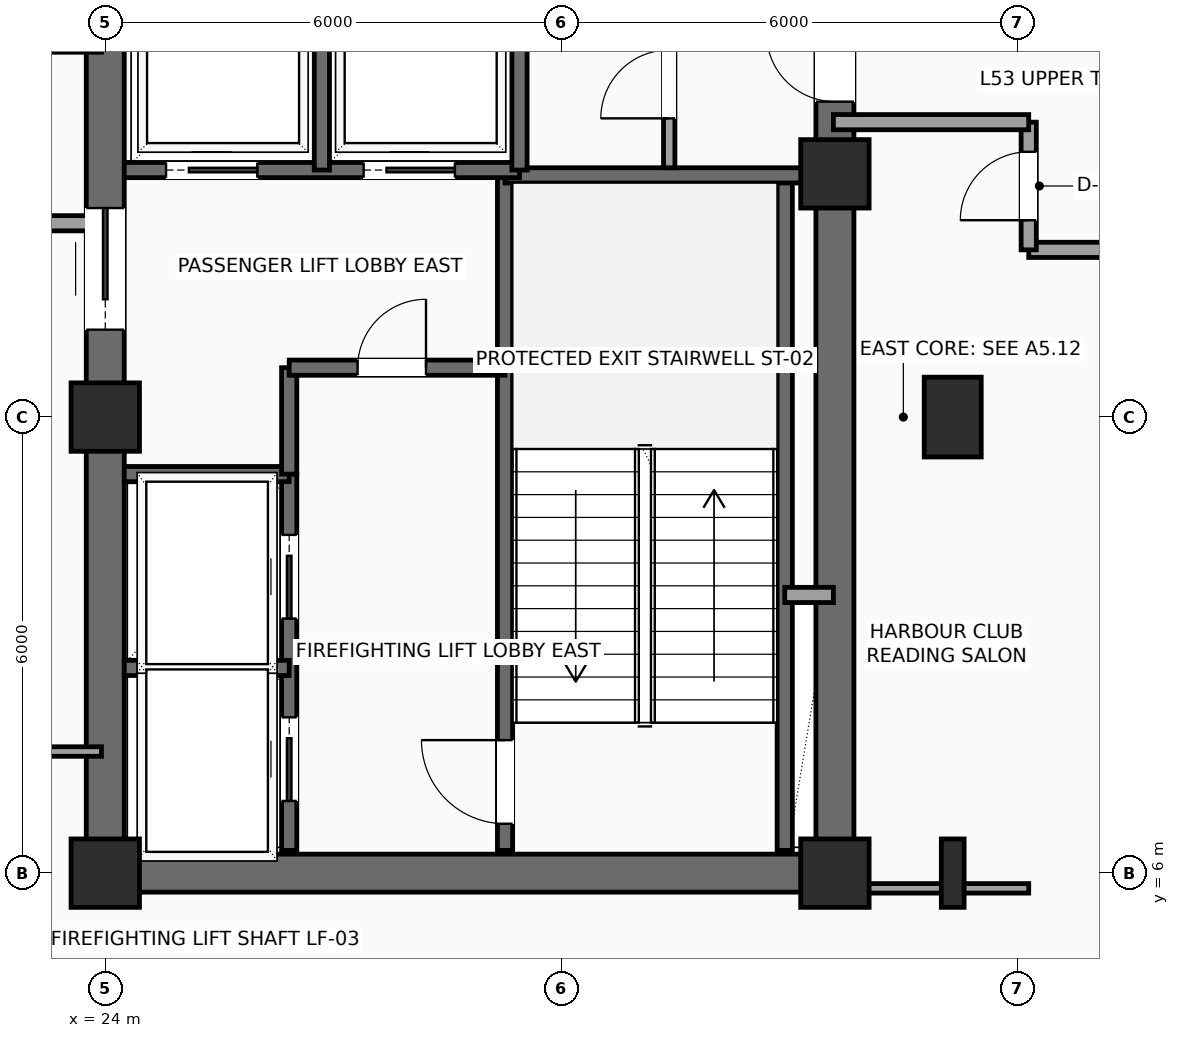
"""IFC4 building model, lengths in metres.
Left out: names, types, materials, properties, quantities, classifications, styles, units other than length and angle.
Written with IfcOpenShell. Run it as: python <this file> out.ifc"""

import sys

from ifc_helpers import new_model, si_unit, direction, frame, frame_2d, origin, origin_2d, place, context, subcontext, project, spatial, rectangle, i_section, extrude, element, fill, save


model = new_model("IFC4")
c1 = context("Model", 3, precision=1e-05, world=origin(), true_north=direction((0.0, 1.0)))
c2 = subcontext(c1, "Body", "Model", "MODEL_VIEW")
j1 = project(units=[si_unit("LENGTHUNIT", "METRE"), si_unit("PLANEANGLEUNIT", "RADIAN")], contexts=[c1])
p1 = place(None, origin())
s1 = spatial("IfcSite", under=j1, at=p1, CompositionType="ELEMENT")
p2 = place(p1, origin())
s2 = spatial("IfcBuilding", under=s1, at=p2, CompositionType="ELEMENT")
p3 = place(p2, frame((0.0, 0.0, 216.15)))
s3 = spatial("IfcBuildingStorey", under=s2, at=p3, CompositionType="ELEMENT", Elevation=216.15)
for number, where, z_axis, x_axis in (
    (1, (24.0, 6.0, 0.0), (0.0, 0.0, 1.0), (1.0, 0.0, 0.0)),
    (2, (24.0, 12.0, 0.0), (0.0, 0.0, 1.0), (1.0, 0.0, 0.0)),
    (3, (33.6, 6.0, 0.0), (0.0, 0.0, 1.0), (1.0, 0.0, 0.0)),
    (4, (33.6, 15.2, 0.0), (0.0, 0.0, 1.0), (1.0, 0.0, 0.0)),
):
    element("IfcColumn", number, at=place(p3, frame(where, z_axis=z_axis, x_axis=x_axis)), inside=s3, PredefinedType="COLUMN", context=c2, shape_type="SweptSolid", body=[
        extrude(rectangle(XDim=0.9, YDim=0.9, at=origin_2d()), origin(), (0.0, 0.0, 1.0), 3.75),
    ])
p4 = place(p3, frame((35.15, 6.0, 0.0), z_axis=(0.0, 0.0, 1.0), x_axis=(1.0, 0.0, 0.0)))
e5 = element("IfcColumn", 5, at=p4, inside=s3, PredefinedType="COLUMN", context=c2, shape_type="SweptSolid", body=[
    extrude(i_section(OverallWidth=0.3, OverallDepth=0.9, WebThickness=0.019, FlangeThickness=0.035, FilletRadius=0.03, at=origin_2d()), origin(), (0.0, 0.0, 1.0), 3.75),
])
p5 = place(p3, frame((35.15, 12.0, 0.0), z_axis=(0.0, 0.0, 1.0), x_axis=(1.0, 0.0, 0.0)))
e6 = element("IfcColumn", 6, at=p5, inside=s3, PredefinedType="COLUMN", context=c2, shape_type="SweptSolid", body=[
    extrude(rectangle(XDim=0.75, YDim=1.05, at=origin_2d()), origin(), (0.0, 0.0, 1.0), 3.75),
])
p6 = place(p3, frame((24.0, 6.0, 0.0), z_axis=(0.0, 0.0, 1.0), x_axis=(1.0, 0.0, 0.0)))
e7 = element("IfcWall", 7, at=p6, inside=s3, PredefinedType="SHEAR", context=c2, shape_type="SweptSolid", body=[
    extrude(rectangle(XDim=9.6, YDim=0.5, at=frame_2d((4.8, 0.0))), origin(), (0.0, 0.0, 1.0), 3.54),
])
p7 = place(p3, frame((24.0, 6.0, 0.0), z_axis=(0.0, 0.0, 1.0), x_axis=(0.0, 1.0, 0.0)))
e8 = element("IfcWall", 8, at=p7, inside=s3, PredefinedType="SHEAR", context=c2, shape_type="SweptSolid", body=[
    extrude(rectangle(XDim=12.0, YDim=0.5, at=frame_2d((6.0, 0.0))), origin(), (0.0, 0.0, 1.0), 3.54),
])
p8 = place(p7, frame((7.15, 0.0, 0.0)))
e9 = element("IfcOpeningElement", 9, at=p8, cuts=e8, PredefinedType="OPENING", context=c2, shape_type="SweptSolid", body=[
    extrude(rectangle(XDim=1.6, YDim=2.3, at=frame_2d((0.8, 1.15))), frame((0.0, 0.26, 0.0), z_axis=(0.0, -1.0, 0.0), x_axis=(1.0, 0.0, 0.0)), (0.0, 0.0, 1.0), 0.52),
])
p9 = place(p3, frame((33.6, 6.0, 0.0), z_axis=(0.0, 0.0, 1.0), x_axis=(0.0, 1.0, 0.0)))
e10 = element("IfcWall", 10, at=p9, inside=s3, PredefinedType="SHEAR", context=c2, shape_type="SweptSolid", body=[
    extrude(rectangle(XDim=12.0, YDim=0.5, at=frame_2d((6.0, 0.0))), origin(), (0.0, 0.0, 1.0), 3.54),
])
p10 = place(p9, frame((10.15, 0.0, 0.0)))
e11 = element("IfcOpeningElement", 11, at=p10, cuts=e10, PredefinedType="OPENING", context=c2, shape_type="SweptSolid", body=[
    extrude(rectangle(XDim=0.9, YDim=2.15, at=frame_2d((0.45, 1.075))), frame((0.0, 0.26, 0.0), z_axis=(0.0, -1.0, 0.0), x_axis=(1.0, 0.0, 0.0)), (0.0, 0.0, 1.0), 0.52),
])
p11 = place(p3, frame((29.26, 6.3, 0.0), z_axis=(0.0, 0.0, 1.0), x_axis=(0.0, 1.0, 0.0)))
e12 = element("IfcWall", 12, at=p11, inside=s3, PredefinedType="SHEAR", context=c2, shape_type="SweptSolid", body=[
    extrude(rectangle(XDim=8.88, YDim=0.2, at=frame_2d((4.44, 0.0))), origin(), (0.0, 0.0, 1.0), 3.54),
])
p12 = place(p11, frame((0.35, 0.0, 0.0)))
e13 = element("IfcOpeningElement", 13, at=p12, cuts=e12, PredefinedType="OPENING", context=c2, shape_type="SweptSolid", body=[
    extrude(rectangle(XDim=1.1, YDim=2.2, at=frame_2d((0.55, 1.1))), frame((0.0, 0.11, 0.0), z_axis=(0.0, -1.0, 0.0), x_axis=(1.0, 0.0, 0.0)), (0.0, 0.0, 1.0), 0.22),
])
p13 = place(p3, frame((32.94, 6.3, 0.0), z_axis=(0.0, 0.0, 1.0), x_axis=(0.0, 1.0, 0.0)))
e14 = element("IfcWall", 14, at=p13, inside=s3, PredefinedType="SHEAR", context=c2, shape_type="SweptSolid", body=[
    extrude(rectangle(XDim=8.88, YDim=0.2, at=frame_2d((4.44, 0.0))), origin(), (0.0, 0.0, 1.0), 3.54),
])
p14 = place(p3, frame((29.26, 15.18, 0.0), z_axis=(0.0, 0.0, 1.0), x_axis=(1.0, 0.0, 0.0)))
e15 = element("IfcWall", 15, at=p14, inside=s3, PredefinedType="SHEAR", context=c2, shape_type="SweptSolid", body=[
    extrude(rectangle(XDim=4.04, YDim=0.2, at=frame_2d((2.02, 0.0))), origin(), (0.0, 0.0, 1.0), 3.54),
])
p15 = place(p3, frame((26.42, 6.3, 0.0), z_axis=(0.0, 0.0, 1.0), x_axis=(0.0, 1.0, 0.0)))
e16 = element("IfcWall", 16, at=p15, inside=s3, PredefinedType="SHEAR", context=c2, shape_type="SweptSolid", body=[
    extrude(rectangle(XDim=4.95, YDim=0.2, at=frame_2d((2.475, 0.0))), origin(), (0.0, 0.0, 1.0), 3.54),
])
p16 = place(p15, frame((0.65, 0.0, 0.0)))
e17 = element("IfcOpeningElement", 17, at=p16, cuts=e16, PredefinedType="OPENING", context=c2, shape_type="SweptSolid", body=[
    extrude(rectangle(XDim=1.1, YDim=2.2, at=frame_2d((0.55, 1.1))), frame((0.0, 0.11, 0.0), z_axis=(0.0, -1.0, 0.0), x_axis=(1.0, 0.0, 0.0)), (0.0, 0.0, 1.0), 0.22),
])
p17 = place(p15, frame((3.05, 0.0, 0.0)))
e18 = element("IfcOpeningElement", 18, at=p17, cuts=e16, PredefinedType="OPENING", context=c2, shape_type="SweptSolid", body=[
    extrude(rectangle(XDim=1.1, YDim=2.2, at=frame_2d((0.55, 1.1))), frame((0.0, 0.11, 0.0), z_axis=(0.0, -1.0, 0.0), x_axis=(1.0, 0.0, 0.0)), (0.0, 0.0, 1.0), 0.22),
])
for number, where, z_axis, x_axis in (
    (19, (24.25, 8.7, 0.0), (0.0, 0.0, 1.0), (1.0, 0.0, 0.0)),
    (20, (24.25, 11.25, 0.0), (0.0, 0.0, 1.0), (1.0, 0.0, 0.0)),
):
    element("IfcWall", number, at=place(p3, frame(where, z_axis=z_axis, x_axis=x_axis)), inside=s3, PredefinedType="SHEAR", context=c2, shape_type="SweptSolid", body=[
        extrude(rectangle(XDim=2.17, YDim=0.2, at=frame_2d((1.085, 0.0))), origin(), (0.0, 0.0, 1.0), 3.54),
    ])
p18 = place(p3, frame((26.42, 11.25, 0.0), z_axis=(0.0, 0.0, 1.0), x_axis=(0.0, 1.0, 0.0)))
e21 = element("IfcWall", 21, at=p18, inside=s3, PredefinedType="SHEAR", context=c2, shape_type="SweptSolid", body=[
    extrude(rectangle(XDim=1.4, YDim=0.2, at=frame_2d((0.7, 0.0))), origin(), (0.0, 0.0, 1.0), 3.54),
])
p19 = place(p3, frame((26.42, 12.65, 0.0), z_axis=(0.0, 0.0, 1.0), x_axis=(1.0, 0.0, 0.0)))
e22 = element("IfcWall", 22, at=p19, inside=s3, PredefinedType="SHEAR", context=c2, shape_type="SweptSolid", body=[
    extrude(rectangle(XDim=2.84, YDim=0.2, at=frame_2d((1.42, 0.0))), origin(), (0.0, 0.0, 1.0), 3.54),
])
p20 = place(p19, frame((0.9, 0.0, 0.0)))
e23 = element("IfcOpeningElement", 23, at=p20, cuts=e22, PredefinedType="OPENING", context=c2, shape_type="SweptSolid", body=[
    extrude(rectangle(XDim=0.9, YDim=2.15, at=frame_2d((0.45, 1.075))), frame((0.0, 0.11, 0.0), z_axis=(0.0, -1.0, 0.0), x_axis=(1.0, 0.0, 0.0)), (0.0, 0.0, 1.0), 0.22),
])
p21 = place(p3, frame((32.94, 9.66, 0.0), z_axis=(0.0, 0.0, 1.0), x_axis=(1.0, 0.0, 0.0)))
e24 = element("IfcWall", 24, at=p21, inside=s3, PredefinedType="SOLIDWALL", context=c2, shape_type="SweptSolid", body=[
    extrude(rectangle(XDim=0.64, YDim=0.2, at=frame_2d((0.32, 0.0))), origin(), (0.0, 0.0, 1.0), 3.54),
])
p22 = place(p3, frame((24.25, 15.25, 0.0), z_axis=(0.0, 0.0, 1.0), x_axis=(1.0, 0.0, 0.0)))
e25 = element("IfcWall", 25, at=p22, inside=s3, PredefinedType="SHEAR", context=c2, shape_type="SweptSolid", body=[
    extrude(rectangle(XDim=5.2, YDim=0.2, at=frame_2d((2.6, 0.0))), origin(), (0.0, 0.0, 1.0), 3.54),
])
p23 = place(p22, frame((0.55, 0.0, 0.0)))
e26 = element("IfcOpeningElement", 26, at=p23, cuts=e25, PredefinedType="OPENING", context=c2, shape_type="SweptSolid", body=[
    extrude(rectangle(XDim=1.2, YDim=2.2, at=frame_2d((0.6, 1.1))), frame((0.0, 0.11, 0.0), z_axis=(0.0, -1.0, 0.0), x_axis=(1.0, 0.0, 0.0)), (0.0, 0.0, 1.0), 0.22),
])
p24 = place(p22, frame((3.15, 0.0, 0.0)))
e27 = element("IfcOpeningElement", 27, at=p24, cuts=e25, PredefinedType="OPENING", context=c2, shape_type="SweptSolid", body=[
    extrude(rectangle(XDim=1.2, YDim=2.2, at=frame_2d((0.6, 1.1))), frame((0.0, 0.11, 0.0), z_axis=(0.0, -1.0, 0.0), x_axis=(1.0, 0.0, 0.0)), (0.0, 0.0, 1.0), 0.22),
])
p25 = place(p3, frame((26.85, 15.25, 0.0), z_axis=(0.0, 0.0, 1.0), x_axis=(0.0, 1.0, 0.0)))
e28 = element("IfcWall", 28, at=p25, inside=s3, PredefinedType="SHEAR", context=c2, shape_type="SweptSolid", body=[
    extrude(rectangle(XDim=2.4, YDim=0.2, at=frame_2d((1.2, 0.0))), origin(), (0.0, 0.0, 1.0), 3.54),
])
p26 = place(p3, frame((29.45, 15.25, 0.0), z_axis=(0.0, 0.0, 1.0), x_axis=(0.0, 1.0, 0.0)))
e29 = element("IfcWall", 29, at=p26, inside=s3, PredefinedType="SHEAR", context=c2, shape_type="SweptSolid", body=[
    extrude(rectangle(XDim=2.45, YDim=0.2, at=frame_2d((1.225, 0.0))), origin(), (0.0, 0.0, 1.0), 3.54),
])
p27 = place(p3, frame((31.42, 15.28, 0.0), z_axis=(0.0, 0.0, 1.0), x_axis=(0.0, 1.0, 0.0)))
e30 = element("IfcWall", 30, at=p27, inside=s3, PredefinedType="PARTITIONING", context=c2, shape_type="SweptSolid", body=[
    extrude(rectangle(XDim=2.42, YDim=0.15, at=frame_2d((1.21, 0.0))), origin(), (0.0, 0.0, 1.0), 3.54),
])
p28 = place(p27, frame((0.65, 0.0, 0.0)))
e31 = element("IfcOpeningElement", 31, at=p28, cuts=e30, PredefinedType="OPENING", context=c2, shape_type="SweptSolid", body=[
    extrude(rectangle(XDim=0.9, YDim=2.15, at=frame_2d((0.45, 1.075))), frame((0.0, 0.085, 0.0), z_axis=(0.0, -1.0, 0.0), x_axis=(1.0, 0.0, 0.0)), (0.0, 0.0, 1.0), 0.17),
])
p29 = place(p3, frame((38.55, 14.2, 0.0), z_axis=(0.0, 0.0, 1.0), x_axis=(-1.0, 0.0, 0.0)))
e32 = element("IfcWall", 32, at=p29, inside=s3, PredefinedType="PARTITIONING", context=c2, shape_type="SweptSolid", body=[
    extrude(rectangle(XDim=2.4, YDim=0.2, at=frame_2d((1.2, 0.0))), origin(), (0.0, 0.0, 1.0), 3.54),
])
p30 = place(p3, frame((36.15, 14.2, 0.0), z_axis=(0.0, 0.0, 1.0), x_axis=(0.0, 1.0, 0.0)))
e33 = element("IfcWall", 33, at=p30, inside=s3, PredefinedType="PARTITIONING", context=c2, shape_type="SweptSolid", body=[
    extrude(rectangle(XDim=1.68, YDim=0.2, at=frame_2d((0.84, 0.0))), origin(), (0.0, 0.0, 1.0), 3.54),
])
p31 = place(p30, frame((0.39, 0.0, 0.0)))
e34 = element("IfcOpeningElement", 34, at=p31, cuts=e33, PredefinedType="OPENING", context=c2, shape_type="SweptSolid", body=[
    extrude(rectangle(XDim=0.9, YDim=2.1, at=frame_2d((0.45, 1.05))), frame((0.0, 0.11, 0.0), z_axis=(0.0, -1.0, 0.0), x_axis=(1.0, 0.0, 0.0)), (0.0, 0.0, 1.0), 0.22),
])
p32 = place(p3, frame((36.15, 15.88, 0.0), z_axis=(0.0, 0.0, 1.0), x_axis=(-1.0, 0.0, 0.0)))
e35 = element("IfcWall", 35, at=p32, inside=s3, PredefinedType="PARTITIONING", context=c2, shape_type="SweptSolid", body=[
    extrude(rectangle(XDim=2.57, YDim=0.2, at=frame_2d((1.285, 0.0))), origin(), (0.0, 0.0, 1.0), 3.54),
])
p33 = place(p3, frame((20.45, 16.9, 0.0), z_axis=(0.0, 0.0, 1.0), x_axis=(1.0, 0.0, 0.0)))
e36 = element("IfcWall", 36, at=p33, inside=s3, PredefinedType="PARTITIONING", context=c2, shape_type="SweptSolid", body=[
    extrude(rectangle(XDim=3.5, YDim=0.2, at=frame_2d((1.75, 0.0))), origin(), (0.0, 0.0, 1.0), 3.54),
])
p34 = place(p3, frame((23.95, 14.55, 0.0), z_axis=(0.0, 0.0, 1.0), x_axis=(-1.0, 0.0, 0.0)))
e37 = element("IfcWall", 37, at=p34, inside=s3, PredefinedType="PARTITIONING", context=c2, shape_type="SweptSolid", body=[
    extrude(rectangle(XDim=9.0, YDim=0.2, at=frame_2d((4.5, 0.0))), origin(), (0.0, 0.0, 1.0), 3.54),
])
p35 = place(p34, frame((2.815, 0.0, 0.0)))
e38 = element("IfcOpeningElement", 38, at=p35, cuts=e37, PredefinedType="OPENING", context=c2, shape_type="SweptSolid", body=[
    extrude(rectangle(XDim=1.0, YDim=2.2, at=frame_2d((0.5, 1.1))), frame((0.0, 0.11, 0.0), z_axis=(0.0, -1.0, 0.0), x_axis=(1.0, 0.0, 0.0)), (0.0, 0.0, 1.0), 0.22),
])
p36 = place(p3, frame((33.65, 5.8, 0.0), z_axis=(0.0, 0.0, 1.0), x_axis=(1.0, 0.0, 0.0)))
e39 = element("IfcWall", 39, at=p36, inside=s3, PredefinedType="PARTITIONING", context=c2, shape_type="SweptSolid", body=[
    extrude(rectangle(XDim=2.5, YDim=0.125, at=frame_2d((1.25, 0.0))), origin(), (0.0, 0.0, 1.0), 3.132),
])
p37 = place(p3, frame((14.95, 7.6, 0.0), z_axis=(0.0, 0.0, 1.0), x_axis=(1.0, 0.0, 0.0)))
e40 = element("IfcWall", 40, at=p37, inside=s3, PredefinedType="PARTITIONING", context=c2, shape_type="SweptSolid", body=[
    extrude(rectangle(XDim=9.0, YDim=0.125, at=frame_2d((4.5, 0.0))), origin(), (0.0, 0.0, 1.0), 3.54),
])
p38 = place(p8, origin())
e41 = element("IfcDoor", 41, at=p38, inside=s3, OperationType="DOUBLE_DOOR_SLIDING", PredefinedType="DOOR", context=c2, shape_type="SweptSolid", body=[
    extrude(rectangle(XDim=1.6, YDim=2.3, at=frame_2d((0.8, 1.15))), frame((0.0, 0.025, 0.0), z_axis=(0.0, -1.0, 0.0), x_axis=(1.0, 0.0, 0.0)), (0.0, 0.0, 1.0), 0.05),
])
fill(e9, e41)
p39 = place(p10, origin())
e42 = element("IfcDoor", 42, at=p39, inside=s3, OperationType="SINGLE_SWING_RIGHT", PredefinedType="DOOR", context=c2, shape_type="SweptSolid", body=[
    extrude(rectangle(XDim=0.9, YDim=2.15, at=frame_2d((0.45, 1.075))), frame((0.0, 0.025, 0.0), z_axis=(0.0, -1.0, 0.0), x_axis=(1.0, 0.0, 0.0)), (0.0, 0.0, 1.0), 0.05),
])
fill(e11, e42)
p40 = place(p12, origin())
e43 = element("IfcDoor", 43, at=p40, inside=s3, OperationType="SINGLE_SWING_RIGHT", PredefinedType="DOOR", context=c2, shape_type="SweptSolid", body=[
    extrude(rectangle(XDim=1.1, YDim=2.2, at=frame_2d((0.55, 1.1))), frame((0.0, 0.025, 0.0), z_axis=(0.0, -1.0, 0.0), x_axis=(1.0, 0.0, 0.0)), (0.0, 0.0, 1.0), 0.05),
])
fill(e13, e43)
p41 = place(p16, origin())
e44 = element("IfcDoor", 44, at=p41, inside=s3, OperationType="SLIDING_TO_LEFT", PredefinedType="DOOR", context=c2, shape_type="SweptSolid", body=[
    extrude(rectangle(XDim=1.1, YDim=2.2, at=frame_2d((0.55, 1.1))), frame((0.0, 0.025, 0.0), z_axis=(0.0, -1.0, 0.0), x_axis=(1.0, 0.0, 0.0)), (0.0, 0.0, 1.0), 0.05),
])
fill(e17, e44)
p42 = place(p17, origin())
e45 = element("IfcDoor", 45, at=p42, inside=s3, OperationType="SLIDING_TO_LEFT", PredefinedType="DOOR", context=c2, shape_type="SweptSolid", body=[
    extrude(rectangle(XDim=1.1, YDim=2.2, at=frame_2d((0.55, 1.1))), frame((0.0, 0.025, 0.0), z_axis=(0.0, -1.0, 0.0), x_axis=(1.0, 0.0, 0.0)), (0.0, 0.0, 1.0), 0.05),
])
fill(e18, e45)
p43 = place(p20, origin())
e46 = element("IfcDoor", 46, at=p43, inside=s3, OperationType="SINGLE_SWING_RIGHT", PredefinedType="DOOR", context=c2, shape_type="SweptSolid", body=[
    extrude(rectangle(XDim=0.9, YDim=2.15, at=frame_2d((0.45, 1.075))), frame((0.0, 0.025, 0.0), z_axis=(0.0, -1.0, 0.0), x_axis=(1.0, 0.0, 0.0)), (0.0, 0.0, 1.0), 0.05),
])
fill(e23, e46)
p44 = place(p23, origin())
e47 = element("IfcDoor", 47, at=p44, inside=s3, OperationType="SLIDING_TO_RIGHT", PredefinedType="DOOR", context=c2, shape_type="SweptSolid", body=[
    extrude(rectangle(XDim=1.2, YDim=2.2, at=frame_2d((0.6, 1.1))), frame((0.0, 0.025, 0.0), z_axis=(0.0, -1.0, 0.0), x_axis=(1.0, 0.0, 0.0)), (0.0, 0.0, 1.0), 0.05),
])
fill(e26, e47)
p45 = place(p24, origin())
e48 = element("IfcDoor", 48, at=p45, inside=s3, OperationType="SLIDING_TO_RIGHT", PredefinedType="DOOR", context=c2, shape_type="SweptSolid", body=[
    extrude(rectangle(XDim=1.2, YDim=2.2, at=frame_2d((0.6, 1.1))), frame((0.0, 0.025, 0.0), z_axis=(0.0, -1.0, 0.0), x_axis=(1.0, 0.0, 0.0)), (0.0, 0.0, 1.0), 0.05),
])
fill(e27, e48)
p46 = place(p28, origin())
e49 = element("IfcDoor", 49, at=p46, inside=s3, OperationType="SINGLE_SWING_LEFT", PredefinedType="DOOR", context=c2, shape_type="SweptSolid", body=[
    extrude(rectangle(XDim=0.9, YDim=2.15, at=frame_2d((0.45, 1.075))), frame((0.0, 0.025, 0.0), z_axis=(0.0, -1.0, 0.0), x_axis=(1.0, 0.0, 0.0)), (0.0, 0.0, 1.0), 0.05),
])
fill(e31, e49)
p47 = place(p31, origin())
e50 = element("IfcDoor", 50, at=p47, inside=s3, OperationType="SINGLE_SWING_LEFT", PredefinedType="DOOR", context=c2, shape_type="SweptSolid", body=[
    extrude(rectangle(XDim=0.9, YDim=2.1, at=frame_2d((0.45, 1.05))), frame((0.0, 0.025, 0.0), z_axis=(0.0, -1.0, 0.0), x_axis=(1.0, 0.0, 0.0)), (0.0, 0.0, 1.0), 0.05),
])
fill(e34, e50)
save(model, sys.argv[1])
